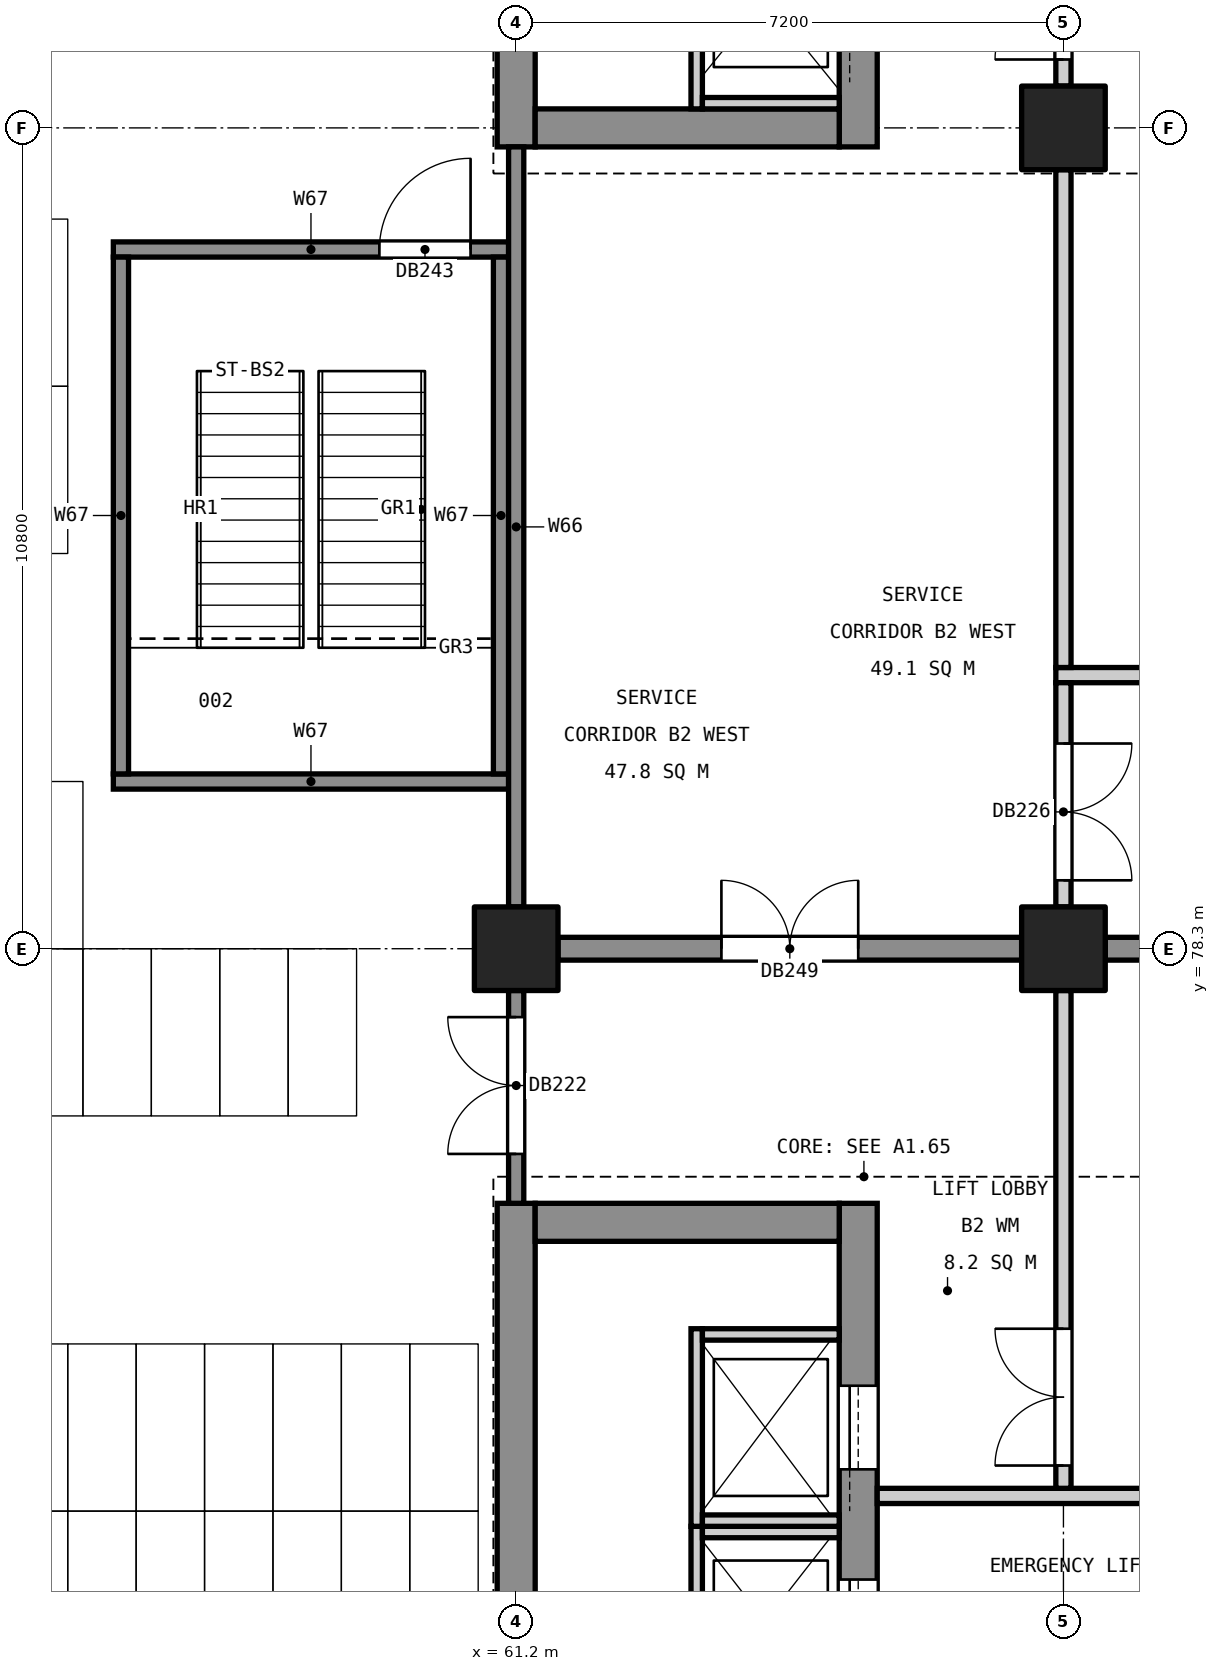
"""IFC4 building model, lengths in metres.
Left out: names, types, materials, properties, quantities, classifications, styles, units other than length and angle.
Written with IfcOpenShell. Run it as: python <this file> out.ifc"""

import sys

from ifc_helpers import new_model, si_unit, direction, frame, frame_2d, origin, origin_2d, place, context, subcontext, project, spatial, rectangle, extrude, element, fill, save


model = new_model("IFC4")
c1 = context("Model", 3, precision=1e-05, world=origin(), true_north=direction((0.0, 1.0)))
c2 = subcontext(c1, "Body", "Model", "MODEL_VIEW")
j1 = project(units=[si_unit("LENGTHUNIT", "METRE"), si_unit("PLANEANGLEUNIT", "RADIAN")], contexts=[c1])
p1 = place(None, origin())
s1 = spatial("IfcSite", under=j1, at=p1, CompositionType="ELEMENT")
p2 = place(p1, origin())
s2 = spatial("IfcBuilding", under=s1, at=p2, CompositionType="ELEMENT")
p3 = place(p2, frame((0.0, 0.0, -9.6)))
s3 = spatial("IfcBuildingStorey", under=s2, at=p3, CompositionType="ELEMENT", Elevation=-9.6)
for number, where, z_axis, x_axis in (
    (1, (61.2, 78.3, 0.0), (0.0, 0.0, 1.0), (1.0, 0.0, 0.0)),
    (2, (68.4, 78.3, 0.0), (0.0, 0.0, 1.0), (1.0, 0.0, 0.0)),
    (3, (68.4, 89.1, 0.0), (0.0, 0.0, 1.0), (1.0, 0.0, 0.0)),
):
    element("IfcColumn", number, at=place(p3, frame(where, z_axis=z_axis, x_axis=x_axis)), inside=s3, PredefinedType="COLUMN", context=c2, shape_type="SweptSolid", body=[
        extrude(rectangle(XDim=1.1, YDim=1.1, at=origin_2d()), origin(), (0.0, 0.0, 1.0), 4.35),
    ])
p4 = place(p3, frame((61.2, 60.05, 0.0), z_axis=(0.0, 0.0, 1.0), x_axis=(0.0, 1.0, 0.0)))
e4 = element("IfcWall", 4, at=p4, inside=s3, PredefinedType="SHEAR", context=c2, shape_type="SweptSolid", body=[
    extrude(rectangle(XDim=14.9, YDim=0.5, at=frame_2d((7.45, 0.0))), origin(), (0.0, 0.0, 1.0), 4.35),
])
p5 = place(p3, frame((65.7, 60.05, 0.0), z_axis=(0.0, 0.0, 1.0), x_axis=(0.0, 1.0, 0.0)))
e5 = element("IfcWall", 5, at=p5, inside=s3, PredefinedType="SHEAR", context=c2, shape_type="SweptSolid", body=[
    extrude(rectangle(XDim=14.9, YDim=0.5, at=frame_2d((7.45, 0.0))), origin(), (0.0, 0.0, 1.0), 4.35),
])
p6 = place(p5, frame((8.85, 0.0, 0.0)))
e6 = element("IfcOpeningElement", 6, at=p6, cuts=e5, PredefinedType="OPENING", context=c2, shape_type="SweptSolid", body=[
    extrude(rectangle(XDim=1.1, YDim=2.1, at=frame_2d((0.55, 1.05))), frame((0.0, 0.26, 0.0), z_axis=(0.0, -1.0, 0.0), x_axis=(1.0, 0.0, 0.0)), (0.0, 0.0, 1.0), 0.52),
])
p7 = place(p5, frame((11.4, 0.0, 0.0)))
e7 = element("IfcOpeningElement", 7, at=p7, cuts=e5, PredefinedType="OPENING", context=c2, shape_type="SweptSolid", body=[
    extrude(rectangle(XDim=1.1, YDim=2.1, at=frame_2d((0.55, 1.05))), frame((0.0, 0.26, 0.0), z_axis=(0.0, -1.0, 0.0), x_axis=(1.0, 0.0, 0.0)), (0.0, 0.0, 1.0), 0.52),
])
p8 = place(p5, frame((3.75, 0.0, 0.0)))
e8 = element("IfcOpeningElement", 8, at=p8, cuts=e5, PredefinedType="OPENING", context=c2, shape_type="SweptSolid", body=[
    extrude(rectangle(XDim=1.0, YDim=2.1, at=frame_2d((0.5, 1.05))), frame((0.0, 0.26, 0.0), z_axis=(0.0, -1.0, 0.0), x_axis=(1.0, 0.0, 0.0)), (0.0, 0.0, 1.0), 0.52),
])
p9 = place(p3, frame((61.45, 74.7, 0.0), z_axis=(0.0, 0.0, 1.0), x_axis=(1.0, 0.0, 0.0)))
e9 = element("IfcWall", 9, at=p9, inside=s3, PredefinedType="SHEAR", context=c2, shape_type="SweptSolid", body=[
    extrude(rectangle(XDim=4.0, YDim=0.5, at=frame_2d((2.0, 0.0))), origin(), (0.0, 0.0, 1.0), 4.35),
])
p10 = place(p3, frame((61.2, 88.85, 0.0), z_axis=(0.0, 0.0, 1.0), x_axis=(0.0, 1.0, 0.0)))
e10 = element("IfcWall", 10, at=p10, inside=s3, PredefinedType="SHEAR", context=c2, shape_type="SweptSolid", body=[
    extrude(rectangle(XDim=11.3, YDim=0.5, at=frame_2d((5.65, 0.0))), origin(), (0.0, 0.0, 1.0), 4.35),
])
p11 = place(p3, frame((65.7, 88.85, 0.0), z_axis=(0.0, 0.0, 1.0), x_axis=(0.0, 1.0, 0.0)))
e11 = element("IfcWall", 11, at=p11, inside=s3, PredefinedType="SHEAR", context=c2, shape_type="SweptSolid", body=[
    extrude(rectangle(XDim=11.3, YDim=0.5, at=frame_2d((5.65, 0.0))), origin(), (0.0, 0.0, 1.0), 4.35),
])
p12 = place(p11, frame((1.4, 0.0, 0.0)))
e12 = element("IfcOpeningElement", 12, at=p12, cuts=e11, PredefinedType="OPENING", context=c2, shape_type="SweptSolid", body=[
    extrude(rectangle(XDim=1.1, YDim=2.1, at=frame_2d((0.55, 1.05))), frame((0.0, 0.26, 0.0), z_axis=(0.0, -1.0, 0.0), x_axis=(1.0, 0.0, 0.0)), (0.0, 0.0, 1.0), 0.52),
])
p13 = place(p11, frame((6.55, 0.0, 0.0)))
e13 = element("IfcOpeningElement", 13, at=p13, cuts=e11, PredefinedType="OPENING", context=c2, shape_type="SweptSolid", body=[
    extrude(rectangle(XDim=1.0, YDim=2.1, at=frame_2d((0.5, 1.05))), frame((0.0, 0.26, 0.0), z_axis=(0.0, -1.0, 0.0), x_axis=(1.0, 0.0, 0.0)), (0.0, 0.0, 1.0), 0.52),
])
p14 = place(p3, frame((61.45, 89.1, 0.0), z_axis=(0.0, 0.0, 1.0), x_axis=(1.0, 0.0, 0.0)))
e14 = element("IfcWall", 14, at=p14, inside=s3, PredefinedType="SHEAR", context=c2, shape_type="SweptSolid", body=[
    extrude(rectangle(XDim=4.0, YDim=0.5, at=frame_2d((2.0, 0.0))), origin(), (0.0, 0.0, 1.0), 4.35),
])
p15 = place(p3, frame((61.75, 78.3, 0.0), z_axis=(0.0, 0.0, 1.0), x_axis=(1.0, 0.0, 0.0)))
e15 = element("IfcWall", 15, at=p15, inside=s3, PredefinedType="SHEAR", context=c2, shape_type="SweptSolid", body=[
    extrude(rectangle(XDim=6.1, YDim=0.3, at=frame_2d((3.05, 0.0))), origin(), (0.0, 0.0, 1.0), 4.35),
])
p16 = place(p15, frame((2.15, 0.0, 0.0)))
e16 = element("IfcOpeningElement", 16, at=p16, cuts=e15, PredefinedType="OPENING", context=c2, shape_type="SweptSolid", body=[
    extrude(rectangle(XDim=1.8, YDim=2.1, at=frame_2d((0.9, 1.05))), frame((0.0, 0.16, 0.0), z_axis=(0.0, -1.0, 0.0), x_axis=(1.0, 0.0, 0.0)), (0.0, 0.0, 1.0), 0.32),
])
p17 = place(p3, frame((68.95, 78.3, 0.0), z_axis=(0.0, 0.0, 1.0), x_axis=(1.0, 0.0, 0.0)))
e17 = element("IfcWall", 17, at=p17, inside=s3, PredefinedType="SHEAR", context=c2, shape_type="SweptSolid", body=[
    extrude(rectangle(XDim=9.7, YDim=0.3, at=frame_2d((4.85, 0.0))), origin(), (0.0, 0.0, 1.0), 4.35),
])
p18 = place(p3, frame((63.575, 68.2, 0.0), z_axis=(0.0, 0.0, 1.0), x_axis=(0.0, 1.0, 0.0)))
e18 = element("IfcWall", 18, at=p18, inside=s3, PredefinedType="SOLIDWALL", context=c2, shape_type="SweptSolid", body=[
    extrude(rectangle(XDim=2.5, YDim=0.15, at=frame_2d((1.25, 0.0))), origin(), (0.0, 0.0, 1.0), 4.8),
])
p19 = place(p3, frame((63.65, 70.625, 0.0), z_axis=(0.0, 0.0, 1.0), x_axis=(1.0, 0.0, 0.0)))
e19 = element("IfcWall", 19, at=p19, inside=s3, PredefinedType="SOLIDWALL", context=c2, shape_type="SweptSolid", body=[
    extrude(rectangle(XDim=1.8, YDim=0.15, at=frame_2d((0.9, 0.0))), origin(), (0.0, 0.0, 1.0), 4.8),
])
p20 = place(p3, frame((63.575, 70.7, 0.0), z_axis=(0.0, 0.0, 1.0), x_axis=(0.0, 1.0, 0.0)))
e20 = element("IfcWall", 20, at=p20, inside=s3, PredefinedType="SOLIDWALL", context=c2, shape_type="SweptSolid", body=[
    extrude(rectangle(XDim=2.6, YDim=0.15, at=frame_2d((1.3, 0.0))), origin(), (0.0, 0.0, 1.0), 4.8),
])
for number, where, z_axis, x_axis in (
    (21, (63.65, 70.775, 0.0), (0.0, 0.0, 1.0), (1.0, 0.0, 0.0)),
    (22, (63.65, 73.225, 0.0), (0.0, 0.0, 1.0), (1.0, 0.0, 0.0)),
):
    element("IfcWall", number, at=place(p3, frame(where, z_axis=z_axis, x_axis=x_axis)), inside=s3, PredefinedType="SOLIDWALL", context=c2, shape_type="SweptSolid", body=[
        extrude(rectangle(XDim=1.8, YDim=0.15, at=frame_2d((0.9, 0.0))), origin(), (0.0, 0.0, 1.0), 4.8),
    ])
p21 = place(p3, frame((63.575, 92.0, 0.0), z_axis=(0.0, 0.0, 1.0), x_axis=(0.0, -1.0, 0.0)))
e23 = element("IfcWall", 23, at=p21, inside=s3, PredefinedType="SOLIDWALL", context=c2, shape_type="SweptSolid", body=[
    extrude(rectangle(XDim=2.65, YDim=0.15, at=frame_2d((1.325, 0.0))), origin(), (0.0, 0.0, 1.0), 4.8),
])
p22 = place(p3, frame((63.65, 89.425, 0.0), z_axis=(0.0, 0.0, 1.0), x_axis=(1.0, 0.0, 0.0)))
e24 = element("IfcWall", 24, at=p22, inside=s3, PredefinedType="SOLIDWALL", context=c2, shape_type="SweptSolid", body=[
    extrude(rectangle(XDim=1.8, YDim=0.15, at=frame_2d((0.9, 0.0))), origin(), (0.0, 0.0, 1.0), 4.8),
])
p23 = place(p3, frame((65.95, 71.1, 0.0), z_axis=(0.0, 0.0, 1.0), x_axis=(1.0, 0.0, 0.0)))
e25 = element("IfcWall", 25, at=p23, inside=s3, PredefinedType="PARTITIONING", context=c2, shape_type="SweptSolid", body=[
    extrude(rectangle(XDim=4.3, YDim=0.2, at=frame_2d((2.15, 0.0))), origin(), (0.0, 0.0, 1.0), 4.35),
])
p24 = place(p3, frame((55.9, 80.5, 0.0), z_axis=(0.0, 0.0, 1.0), x_axis=(1.0, 0.0, 0.0)))
e26 = element("IfcWall", 26, at=p24, inside=s3, PredefinedType="SOLIDWALL", context=c2, shape_type="SweptSolid", body=[
    extrude(rectangle(XDim=5.2, YDim=0.2, at=frame_2d((2.6, 0.0))), origin(), (0.0, 0.0, 1.0), 4.35),
])
p25 = place(p3, frame((68.3, 81.9, 0.0), z_axis=(0.0, 0.0, 1.0), x_axis=(1.0, 0.0, 0.0)))
e27 = element("IfcWall", 27, at=p25, inside=s3, PredefinedType="PARTITIONING", context=c2, shape_type="SweptSolid", body=[
    extrude(rectangle(XDim=11.0, YDim=0.2, at=frame_2d((5.5, 0.0))), origin(), (0.0, 0.0, 1.0), 4.35),
])
p26 = place(p3, frame((55.9, 87.5, 0.0), z_axis=(0.0, 0.0, 1.0), x_axis=(1.0, 0.0, 0.0)))
e28 = element("IfcWall", 28, at=p26, inside=s3, PredefinedType="SOLIDWALL", context=c2, shape_type="SweptSolid", body=[
    extrude(rectangle(XDim=5.2, YDim=0.2, at=frame_2d((2.6, 0.0))), origin(), (0.0, 0.0, 1.0), 4.35),
])
p27 = place(p26, frame((3.5, 0.0, 0.0)))
e29 = element("IfcOpeningElement", 29, at=p27, cuts=e28, PredefinedType="OPENING", context=c2, shape_type="SweptSolid", body=[
    extrude(rectangle(XDim=1.2, YDim=2.1, at=frame_2d((0.6, 1.05))), frame((0.0, 0.11, 0.0), z_axis=(0.0, -1.0, 0.0), x_axis=(1.0, 0.0, 0.0)), (0.0, 0.0, 1.0), 0.22),
])
for number, where, z_axis, x_axis in (
    (30, (56.0, 80.6, 0.0), (0.0, 0.0, 1.0), (0.0, 1.0, 0.0)),
    (31, (61.0, 80.6, 0.0), (0.0, 0.0, 1.0), (0.0, 1.0, 0.0)),
):
    element("IfcWall", number, at=place(p3, frame(where, z_axis=z_axis, x_axis=x_axis)), inside=s3, PredefinedType="SOLIDWALL", context=c2, shape_type="SweptSolid", body=[
        extrude(rectangle(XDim=6.8, YDim=0.2, at=frame_2d((3.4, 0.0))), origin(), (0.0, 0.0, 1.0), 4.35),
    ])
p28 = place(p3, frame((61.2, 74.95, 0.0), z_axis=(0.0, 0.0, 1.0), x_axis=(0.0, 1.0, 0.0)))
e32 = element("IfcWall", 32, at=p28, inside=s3, PredefinedType="SOLIDWALL", context=c2, shape_type="SweptSolid", body=[
    extrude(rectangle(XDim=2.8, YDim=0.2, at=frame_2d((1.4, 0.0))), origin(), (0.0, 0.0, 1.0), 4.35),
])
p29 = place(p28, frame((0.65, 0.0, 0.0)))
e33 = element("IfcOpeningElement", 33, at=p29, cuts=e32, PredefinedType="OPENING", context=c2, shape_type="SweptSolid", body=[
    extrude(rectangle(XDim=1.8, YDim=2.1, at=frame_2d((0.9, 1.05))), frame((0.0, 0.11, 0.0), z_axis=(0.0, -1.0, 0.0), x_axis=(1.0, 0.0, 0.0)), (0.0, 0.0, 1.0), 0.22),
])
p30 = place(p3, frame((61.2, 78.85, 0.0), z_axis=(0.0, 0.0, 1.0), x_axis=(0.0, 1.0, 0.0)))
e34 = element("IfcWall", 34, at=p30, inside=s3, PredefinedType="SOLIDWALL", context=c2, shape_type="SweptSolid", body=[
    extrude(rectangle(XDim=10.0, YDim=0.2, at=frame_2d((5.0, 0.0))), origin(), (0.0, 0.0, 1.0), 4.35),
])
p31 = place(p3, frame((68.4, 71.2, 0.0), z_axis=(0.0, 0.0, 1.0), x_axis=(0.0, 1.0, 0.0)))
e35 = element("IfcWall", 35, at=p31, inside=s3, PredefinedType="PARTITIONING", context=c2, shape_type="SweptSolid", body=[
    extrude(rectangle(XDim=6.55, YDim=0.2, at=frame_2d((3.275, 0.0))), origin(), (0.0, 0.0, 1.0), 4.35),
])
p32 = place(p31, frame((0.3, 0.0, 0.0)))
e36 = element("IfcOpeningElement", 36, at=p32, cuts=e35, PredefinedType="OPENING", context=c2, shape_type="SweptSolid", body=[
    extrude(rectangle(XDim=1.8, YDim=2.1, at=frame_2d((0.9, 1.05))), frame((0.0, 0.11, 0.0), z_axis=(0.0, -1.0, 0.0), x_axis=(1.0, 0.0, 0.0)), (0.0, 0.0, 1.0), 0.22),
])
p33 = place(p3, frame((68.4, 78.85, 0.0), z_axis=(0.0, 0.0, 1.0), x_axis=(0.0, 1.0, 0.0)))
e37 = element("IfcWall", 37, at=p33, inside=s3, PredefinedType="PARTITIONING", context=c2, shape_type="SweptSolid", body=[
    extrude(rectangle(XDim=2.95, YDim=0.2, at=frame_2d((1.475, 0.0))), origin(), (0.0, 0.0, 1.0), 4.35),
])
p34 = place(p33, frame((0.35, 0.0, 0.0)))
e38 = element("IfcOpeningElement", 38, at=p34, cuts=e37, PredefinedType="OPENING", context=c2, shape_type="SweptSolid", body=[
    extrude(rectangle(XDim=1.8, YDim=2.1, at=frame_2d((0.9, 1.05))), frame((0.0, 0.11, 0.0), z_axis=(0.0, -1.0, 0.0), x_axis=(1.0, 0.0, 0.0)), (0.0, 0.0, 1.0), 0.22),
])
p35 = place(p3, frame((68.4, 82.0, 0.0), z_axis=(0.0, 0.0, 1.0), x_axis=(0.0, 1.0, 0.0)))
e39 = element("IfcWall", 39, at=p35, inside=s3, PredefinedType="PARTITIONING", context=c2, shape_type="SweptSolid", body=[
    extrude(rectangle(XDim=6.55, YDim=0.2, at=frame_2d((3.275, 0.0))), origin(), (0.0, 0.0, 1.0), 4.35),
])
p36 = place(p3, frame((68.4, 89.65, 0.0), z_axis=(0.0, 0.0, 1.0), x_axis=(0.0, 1.0, 0.0)))
e40 = element("IfcWall", 40, at=p36, inside=s3, PredefinedType="PARTITIONING", context=c2, shape_type="SweptSolid", body=[
    extrude(rectangle(XDim=9.7, YDim=0.2, at=frame_2d((4.85, 0.0))), origin(), (0.0, 0.0, 1.0), 4.35),
])
p37 = place(p36, frame((0.35, 0.0, 0.0)))
e41 = element("IfcOpeningElement", 41, at=p37, cuts=e40, PredefinedType="OPENING", context=c2, shape_type="SweptSolid", body=[
    extrude(rectangle(XDim=1.8, YDim=2.1, at=frame_2d((0.9, 1.05))), frame((0.0, 0.11, 0.0), z_axis=(0.0, -1.0, 0.0), x_axis=(1.0, 0.0, 0.0)), (0.0, 0.0, 1.0), 0.22),
])
p38 = place(p6, origin())
e42 = element("IfcDoor", 42, at=p38, inside=s3, OperationType="SLIDING_TO_LEFT", PredefinedType="DOOR", context=c2, shape_type="SweptSolid", body=[
    extrude(rectangle(XDim=1.1, YDim=2.1, at=frame_2d((0.55, 1.05))), frame((0.0, 0.025, 0.0), z_axis=(0.0, -1.0, 0.0), x_axis=(1.0, 0.0, 0.0)), (0.0, 0.0, 1.0), 0.05),
])
fill(e6, e42)
p39 = place(p7, origin())
e43 = element("IfcDoor", 43, at=p39, inside=s3, OperationType="SLIDING_TO_LEFT", PredefinedType="DOOR", context=c2, shape_type="SweptSolid", body=[
    extrude(rectangle(XDim=1.1, YDim=2.1, at=frame_2d((0.55, 1.05))), frame((0.0, 0.025, 0.0), z_axis=(0.0, -1.0, 0.0), x_axis=(1.0, 0.0, 0.0)), (0.0, 0.0, 1.0), 0.05),
])
fill(e7, e43)
p40 = place(p32, origin())
e44 = element("IfcDoor", 44, at=p40, inside=s3, OperationType="DOUBLE_DOOR_SINGLE_SWING", PredefinedType="DOOR", context=c2, shape_type="SweptSolid", body=[
    extrude(rectangle(XDim=1.8, YDim=2.1, at=frame_2d((0.9, 1.05))), frame((0.0, 0.025, 0.0), z_axis=(0.0, -1.0, 0.0), x_axis=(1.0, 0.0, 0.0)), (0.0, 0.0, 1.0), 0.05),
])
fill(e36, e44)
p41 = place(p37, origin())
e45 = element("IfcDoor", 45, at=p41, inside=s3, OperationType="DOUBLE_DOOR_SINGLE_SWING", PredefinedType="DOOR", context=c2, shape_type="SweptSolid", body=[
    extrude(rectangle(XDim=1.8, YDim=2.1, at=frame_2d((0.9, 1.05))), frame((0.0, 0.025, 0.0), z_axis=(0.0, -1.0, 0.0), x_axis=(1.0, 0.0, 0.0)), (0.0, 0.0, 1.0), 0.05),
])
fill(e41, e45)
p42 = place(p29, origin())
e46 = element("IfcDoor", 46, at=p42, inside=s3, OperationType="DOUBLE_DOOR_SINGLE_SWING", PredefinedType="DOOR", context=c2, shape_type="SweptSolid", body=[
    extrude(rectangle(XDim=1.8, YDim=2.1, at=frame_2d((0.9, 1.05))), frame((0.0, 0.025, 0.0), z_axis=(0.0, -1.0, 0.0), x_axis=(1.0, 0.0, 0.0)), (0.0, 0.0, 1.0), 0.05),
])
fill(e33, e46)
p43 = place(p34, frame((1.8, 0.0, 0.0), z_axis=(0.0, 0.0, 1.0), x_axis=(-1.0, 0.0, 0.0)))
e47 = element("IfcDoor", 47, at=p43, inside=s3, OperationType="DOUBLE_DOOR_SINGLE_SWING", PredefinedType="DOOR", context=c2, shape_type="SweptSolid", body=[
    extrude(rectangle(XDim=1.8, YDim=2.1, at=frame_2d((0.9, 1.05))), frame((0.0, 0.025, 0.0), z_axis=(0.0, -1.0, 0.0), x_axis=(1.0, 0.0, 0.0)), (0.0, 0.0, 1.0), 0.05),
])
fill(e38, e47)
p44 = place(p27, origin())
e48 = element("IfcDoor", 48, at=p44, inside=s3, OperationType="SINGLE_SWING_RIGHT", PredefinedType="DOOR", context=c2, shape_type="SweptSolid", body=[
    extrude(rectangle(XDim=1.2, YDim=2.1, at=frame_2d((0.6, 1.05))), frame((0.0, 0.025, 0.0), z_axis=(0.0, -1.0, 0.0), x_axis=(1.0, 0.0, 0.0)), (0.0, 0.0, 1.0), 0.05),
])
fill(e29, e48)
p45 = place(p16, origin())
e49 = element("IfcDoor", 49, at=p45, inside=s3, OperationType="DOUBLE_DOOR_SINGLE_SWING", PredefinedType="DOOR", context=c2, shape_type="SweptSolid", body=[
    extrude(rectangle(XDim=1.8, YDim=2.1, at=frame_2d((0.9, 1.05))), frame((0.0, 0.025, 0.0), z_axis=(0.0, -1.0, 0.0), x_axis=(1.0, 0.0, 0.0)), (0.0, 0.0, 1.0), 0.05),
])
fill(e16, e49)
save(model, sys.argv[1])
